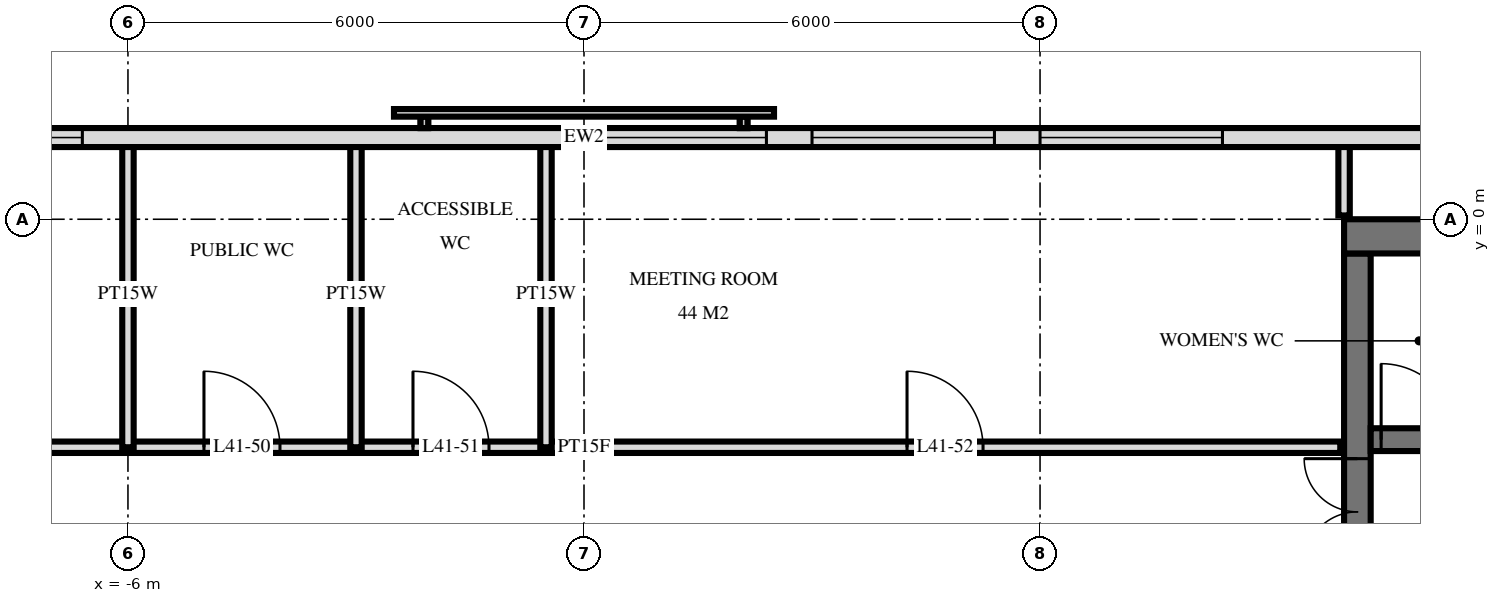
"""IFC4 building model, lengths in metres.
Left out: names, types, materials, properties, quantities, classifications, styles, units other than length and angle.
Written with IfcOpenShell. Run it as: python <this file> out.ifc"""

import sys

from ifc_helpers import new_model, si_unit, direction, frame, frame_2d, origin, place, context, subcontext, project, spatial, rectangle, extrude, element, fill, save


model = new_model("IFC4")
c1 = context("Model", 3, precision=1e-05, world=origin(), true_north=direction((0.0, 1.0)))
c2 = subcontext(c1, "Body", "Model", "MODEL_VIEW")
j1 = project(units=[si_unit("LENGTHUNIT", "METRE"), si_unit("PLANEANGLEUNIT", "RADIAN")], contexts=[c1])
p1 = place(None, origin())
s1 = spatial("IfcSite", under=j1, at=p1, CompositionType="ELEMENT")
p2 = place(p1, origin())
s2 = spatial("IfcBuilding", under=s1, at=p2, CompositionType="ELEMENT")
p3 = place(p2, frame((0.0, 0.0, 159.6)))
s3 = spatial("IfcBuildingStorey", under=s2, at=p3, CompositionType="ELEMENT", Elevation=159.6)
p4 = place(p3, frame((10.0, -0.225, 0.0), z_axis=(0.0, 0.0, 1.0), x_axis=(1.0, 0.0, 0.0)))
e1 = element("IfcWall", 1, at=p4, inside=s3, PredefinedType="SHEAR", context=c2, shape_type="SweptSolid", body=[
    extrude(rectangle(XDim=14.5, YDim=0.45, at=frame_2d((7.25, 0.0))), origin(), (0.0, 0.0, 1.0), 3.6),
])
p5 = place(p3, frame((10.175, -14.55, 0.0), z_axis=(0.0, 0.0, 1.0), x_axis=(0.0, 1.0, 0.0)))
e2 = element("IfcWall", 2, at=p5, inside=s3, PredefinedType="SHEAR", context=c2, shape_type="SweptSolid", body=[
    extrude(rectangle(XDim=14.1, YDim=0.35, at=frame_2d((7.05, 0.0))), origin(), (0.0, 0.0, 1.0), 3.6),
])
p6 = place(p5, frame((8.4, 0.0, 0.0)))
e3 = element("IfcOpeningElement", 3, at=p6, cuts=e2, PredefinedType="OPENING", context=c2, shape_type="SweptSolid", body=[
    extrude(rectangle(XDim=1.4, YDim=2.4, at=frame_2d((0.7, 1.2))), frame((0.0, 0.185, 0.0), z_axis=(0.0, -1.0, 0.0), x_axis=(1.0, 0.0, 0.0)), (0.0, 0.0, 1.0), 0.37),
])
p7 = place(p5, frame((10.0, 0.0, 0.0)))
e4 = element("IfcOpeningElement", 4, at=p7, cuts=e2, PredefinedType="OPENING", context=c2, shape_type="SweptSolid", body=[
    extrude(rectangle(XDim=1.4, YDim=2.4, at=frame_2d((0.7, 1.2))), frame((0.0, 0.185, 0.0), z_axis=(0.0, -1.0, 0.0), x_axis=(1.0, 0.0, 0.0)), (0.0, 0.0, 1.0), 0.37),
])
p8 = place(p5, frame((4.0, 0.0, 0.0)))
e5 = element("IfcOpeningElement", 5, at=p8, cuts=e2, PredefinedType="OPENING", context=c2, shape_type="SweptSolid", body=[
    extrude(rectangle(XDim=1.2, YDim=2.1, at=frame_2d((0.6, 1.05))), frame((0.0, 0.185, 0.0), z_axis=(0.0, -1.0, 0.0), x_axis=(1.0, 0.0, 0.0)), (0.0, 0.0, 1.0), 0.37),
])
p9 = place(p3, frame((10.35, -2.9, 0.0), z_axis=(0.0, 0.0, 1.0), x_axis=(1.0, 0.0, 0.0)))
e6 = element("IfcWall", 6, at=p9, inside=s3, PredefinedType="SHEAR", context=c2, shape_type="SweptSolid", body=[
    extrude(rectangle(XDim=13.7, YDim=0.3, at=frame_2d((6.85, 0.0))), origin(), (0.0, 0.0, 1.0), 3.6),
])
p10 = place(p9, frame((12.05, 0.0, 0.0)))
e7 = element("IfcOpeningElement", 7, at=p10, cuts=e6, PredefinedType="OPENING", context=c2, shape_type="SweptSolid", body=[
    extrude(rectangle(XDim=1.1, YDim=2.1, at=frame_2d((0.55, 1.05))), frame((0.0, 0.16, 0.0), z_axis=(0.0, -1.0, 0.0), x_axis=(1.0, 0.0, 0.0)), (0.0, 0.0, 1.0), 0.32),
])
p11 = place(p9, frame((6.188, 0.0, 0.0)))
e8 = element("IfcOpeningElement", 8, at=p11, cuts=e6, PredefinedType="OPENING", context=c2, shape_type="SweptSolid", body=[
    extrude(rectangle(XDim=0.9, YDim=2.1, at=frame_2d((0.45, 1.05))), frame((0.0, 0.16, 0.0), z_axis=(0.0, -1.0, 0.0), x_axis=(1.0, 0.0, 0.0)), (0.0, 0.0, 1.0), 0.32),
])
p12 = place(p9, frame((7.613, 0.0, 0.0)))
e9 = element("IfcOpeningElement", 9, at=p12, cuts=e6, PredefinedType="OPENING", context=c2, shape_type="SweptSolid", body=[
    extrude(rectangle(XDim=0.9, YDim=2.1, at=frame_2d((0.45, 1.05))), frame((0.0, 0.16, 0.0), z_axis=(0.0, -1.0, 0.0), x_axis=(1.0, 0.0, 0.0)), (0.0, 0.0, 1.0), 0.32),
])
p13 = place(p9, frame((0.137, 0.0, 0.0)))
e10 = element("IfcOpeningElement", 10, at=p13, cuts=e6, PredefinedType="OPENING", context=c2, shape_type="SweptSolid", body=[
    extrude(rectangle(XDim=1.0, YDim=2.1, at=frame_2d((0.5, 1.05))), frame((0.0, 0.16, 0.0), z_axis=(0.0, -1.0, 0.0), x_axis=(1.0, 0.0, 0.0)), (0.0, 0.0, 1.0), 0.32),
])
p14 = place(p9, frame((1.562, 0.0, 0.0)))
e11 = element("IfcOpeningElement", 11, at=p14, cuts=e6, PredefinedType="OPENING", context=c2, shape_type="SweptSolid", body=[
    extrude(rectangle(XDim=1.0, YDim=2.1, at=frame_2d((0.5, 1.05))), frame((0.0, 0.16, 0.0), z_axis=(0.0, -1.0, 0.0), x_axis=(1.0, 0.0, 0.0)), (0.0, 0.0, 1.0), 0.32),
])
p15 = place(p9, frame((3.85, 0.0, 0.0)))
e12 = element("IfcOpeningElement", 12, at=p15, cuts=e6, PredefinedType="OPENING", context=c2, shape_type="SweptSolid", body=[
    extrude(rectangle(XDim=1.0, YDim=2.1, at=frame_2d((0.5, 1.05))), frame((0.0, 0.16, 0.0), z_axis=(0.0, -1.0, 0.0), x_axis=(1.0, 0.0, 0.0)), (0.0, 0.0, 1.0), 0.32),
])
p16 = place(p9, frame((9.7, 0.0, 0.0)))
e13 = element("IfcOpeningElement", 13, at=p16, cuts=e6, PredefinedType="OPENING", context=c2, shape_type="SweptSolid", body=[
    extrude(rectangle(XDim=1.0, YDim=2.1, at=frame_2d((0.5, 1.05))), frame((0.0, 0.16, 0.0), z_axis=(0.0, -1.0, 0.0), x_axis=(1.0, 0.0, 0.0)), (0.0, 0.0, 1.0), 0.32),
])
p17 = place(p3, frame((23.675, 1.075, 0.0), z_axis=(0.0, 0.0, 1.0), x_axis=(-1.0, 0.0, 0.0)))
e14 = element("IfcWall", 14, at=p17, inside=s3, PredefinedType="SOLIDWALL", context=c2, shape_type="SweptSolid", body=[
    extrude(rectangle(XDim=47.351, YDim=0.25, at=frame_2d((23.675, 0.0))), origin(), (0.0, 0.0, 1.0), 3.32),
])
p18 = place(p17, frame((15.275, 0.0, 0.3)))
e15 = element("IfcOpeningElement", 15, at=p18, cuts=e14, PredefinedType="OPENING", context=c2, shape_type="SweptSolid", body=[
    extrude(rectangle(XDim=2.4, YDim=2.1, at=frame_2d((1.2, 1.05))), frame((0.0, 0.135, 0.0), z_axis=(0.0, -1.0, 0.0), x_axis=(1.0, 0.0, 0.0)), (0.0, 0.0, 1.0), 0.27),
])
p19 = place(p17, frame((18.275, 0.0, 0.3)))
e16 = element("IfcOpeningElement", 16, at=p19, cuts=e14, PredefinedType="OPENING", context=c2, shape_type="SweptSolid", body=[
    extrude(rectangle(XDim=2.4, YDim=2.1, at=frame_2d((1.2, 1.05))), frame((0.0, 0.135, 0.0), z_axis=(0.0, -1.0, 0.0), x_axis=(1.0, 0.0, 0.0)), (0.0, 0.0, 1.0), 0.27),
])
p20 = place(p17, frame((21.275, 0.0, 0.3)))
e17 = element("IfcOpeningElement", 17, at=p20, cuts=e14, PredefinedType="OPENING", context=c2, shape_type="SweptSolid", body=[
    extrude(rectangle(XDim=2.4, YDim=2.1, at=frame_2d((1.2, 1.05))), frame((0.0, 0.135, 0.0), z_axis=(0.0, -1.0, 0.0), x_axis=(1.0, 0.0, 0.0)), (0.0, 0.0, 1.0), 0.27),
])
p21 = place(p17, frame((30.275, 0.0, 0.3)))
e18 = element("IfcOpeningElement", 18, at=p21, cuts=e14, PredefinedType="OPENING", context=c2, shape_type="SweptSolid", body=[
    extrude(rectangle(XDim=2.4, YDim=2.1, at=frame_2d((1.2, 1.05))), frame((0.0, 0.135, 0.0), z_axis=(0.0, -1.0, 0.0), x_axis=(1.0, 0.0, 0.0)), (0.0, 0.0, 1.0), 0.27),
])
p22 = place(p3, frame((10.0, 0.05, 0.0), z_axis=(0.0, 0.0, 1.0), x_axis=(0.0, 1.0, 0.0)))
e19 = element("IfcWall", 19, at=p22, inside=s3, PredefinedType="PARTITIONING", context=c2, shape_type="SweptSolid", body=[
    extrude(rectangle(XDim=0.97, YDim=0.15, at=frame_2d((0.485, 0.0))), origin(), (0.0, 0.0, 1.0), 3.32),
])
for number, where, z_axis, x_axis in (
    (20, (-0.5, -3.0, 0.0), (0.0, 0.0, 1.0), (0.0, 1.0, 0.0)),
    (21, (-3.0, -3.0, 0.0), (0.0, 0.0, 1.0), (0.0, 1.0, 0.0)),
    (22, (-6.0, -3.0, 0.0), (0.0, 0.0, 1.0), (0.0, 1.0, 0.0)),
):
    element("IfcWall", number, at=place(p3, frame(where, z_axis=z_axis, x_axis=x_axis)), inside=s3, PredefinedType="PLUMBINGWALL", context=c2, shape_type="SweptSolid", body=[
        extrude(rectangle(XDim=4.02, YDim=0.15, at=frame_2d((2.01, 0.0))), origin(), (0.0, 0.0, 1.0), 3.32),
    ])
p23 = place(p3, frame((-9.95, -3.0, 0.0), z_axis=(0.0, 0.0, 1.0), x_axis=(1.0, 0.0, 0.0)))
e23 = element("IfcWall", 23, at=p23, inside=s3, PredefinedType="PARTITIONING", context=c2, shape_type="SweptSolid", body=[
    extrude(rectangle(XDim=19.9, YDim=0.15, at=frame_2d((9.95, 0.0))), origin(), (0.0, 0.0, 1.0), 3.32),
])
p24 = place(p23, frame((1.45, 0.0, 0.0)))
e24 = element("IfcOpeningElement", 24, at=p24, cuts=e23, PredefinedType="OPENING", context=c2, shape_type="SweptSolid", body=[
    extrude(rectangle(XDim=1.0, YDim=2.1, at=frame_2d((0.5, 1.05))), frame((0.0, 0.085, 0.0), z_axis=(0.0, -1.0, 0.0), x_axis=(1.0, 0.0, 0.0)), (0.0, 0.0, 1.0), 0.17),
])
p25 = place(p23, frame((4.95, 0.0, 0.0)))
e25 = element("IfcOpeningElement", 25, at=p25, cuts=e23, PredefinedType="OPENING", context=c2, shape_type="SweptSolid", body=[
    extrude(rectangle(XDim=1.0, YDim=2.1, at=frame_2d((0.5, 1.05))), frame((0.0, 0.085, 0.0), z_axis=(0.0, -1.0, 0.0), x_axis=(1.0, 0.0, 0.0)), (0.0, 0.0, 1.0), 0.17),
])
p26 = place(p23, frame((7.7, 0.0, 0.0)))
e26 = element("IfcOpeningElement", 26, at=p26, cuts=e23, PredefinedType="OPENING", context=c2, shape_type="SweptSolid", body=[
    extrude(rectangle(XDim=1.0, YDim=2.1, at=frame_2d((0.5, 1.05))), frame((0.0, 0.085, 0.0), z_axis=(0.0, -1.0, 0.0), x_axis=(1.0, 0.0, 0.0)), (0.0, 0.0, 1.0), 0.17),
])
p27 = place(p23, frame((14.2, 0.0, 0.0)))
e27 = element("IfcOpeningElement", 27, at=p27, cuts=e23, PredefinedType="OPENING", context=c2, shape_type="SweptSolid", body=[
    extrude(rectangle(XDim=1.0, YDim=2.1, at=frame_2d((0.5, 1.05))), frame((0.0, 0.085, 0.0), z_axis=(0.0, -1.0, 0.0), x_axis=(1.0, 0.0, 0.0)), (0.0, 0.0, 1.0), 0.17),
])
p28 = place(p18, origin())
e28 = element("IfcWindow", 28, at=p28, inside=s3, PartitioningType="SINGLE_PANEL", PredefinedType="WINDOW", context=c2, shape_type="SweptSolid", body=[
    extrude(rectangle(XDim=2.4, YDim=2.1, at=frame_2d((1.2, 1.05))), frame((0.0, 0.03, 0.0), z_axis=(0.0, -1.0, 0.0), x_axis=(1.0, 0.0, 0.0)), (0.0, 0.0, 1.0), 0.06),
])
fill(e15, e28)
p29 = place(p19, origin())
e29 = element("IfcWindow", 29, at=p29, inside=s3, PartitioningType="SINGLE_PANEL", PredefinedType="WINDOW", context=c2, shape_type="SweptSolid", body=[
    extrude(rectangle(XDim=2.4, YDim=2.1, at=frame_2d((1.2, 1.05))), frame((0.0, 0.03, 0.0), z_axis=(0.0, -1.0, 0.0), x_axis=(1.0, 0.0, 0.0)), (0.0, 0.0, 1.0), 0.06),
])
fill(e16, e29)
p30 = place(p20, origin())
e30 = element("IfcWindow", 30, at=p30, inside=s3, PartitioningType="SINGLE_PANEL", PredefinedType="WINDOW", context=c2, shape_type="SweptSolid", body=[
    extrude(rectangle(XDim=2.4, YDim=2.1, at=frame_2d((1.2, 1.05))), frame((0.0, 0.03, 0.0), z_axis=(0.0, -1.0, 0.0), x_axis=(1.0, 0.0, 0.0)), (0.0, 0.0, 1.0), 0.06),
])
fill(e17, e30)
p31 = place(p21, origin())
e31 = element("IfcWindow", 31, at=p31, inside=s3, PartitioningType="SINGLE_PANEL", PredefinedType="WINDOW", context=c2, shape_type="SweptSolid", body=[
    extrude(rectangle(XDim=2.4, YDim=2.1, at=frame_2d((1.2, 1.05))), frame((0.0, 0.03, 0.0), z_axis=(0.0, -1.0, 0.0), x_axis=(1.0, 0.0, 0.0)), (0.0, 0.0, 1.0), 0.06),
])
fill(e18, e31)
p32 = place(p7, origin())
e32 = element("IfcDoor", 32, at=p32, inside=s3, OperationType="DOUBLE_DOOR_SINGLE_SWING", PredefinedType="DOOR", context=c2, shape_type="SweptSolid", body=[
    extrude(rectangle(XDim=1.4, YDim=2.4, at=frame_2d((0.7, 1.2))), frame((0.0, 0.025, 0.0), z_axis=(0.0, -1.0, 0.0), x_axis=(1.0, 0.0, 0.0)), (0.0, 0.0, 1.0), 0.05),
])
fill(e4, e32)
p33 = place(p13, origin())
e33 = element("IfcDoor", 33, at=p33, inside=s3, OperationType="SINGLE_SWING_RIGHT", PredefinedType="DOOR", context=c2, shape_type="SweptSolid", body=[
    extrude(rectangle(XDim=1.0, YDim=2.1, at=frame_2d((0.5, 1.05))), frame((0.0, 0.025, 0.0), z_axis=(0.0, -1.0, 0.0), x_axis=(1.0, 0.0, 0.0)), (0.0, 0.0, 1.0), 0.05),
])
fill(e10, e33)
p34 = place(p25, origin())
e34 = element("IfcDoor", 34, at=p34, inside=s3, OperationType="SINGLE_SWING_RIGHT", PredefinedType="DOOR", context=c2, shape_type="SweptSolid", body=[
    extrude(rectangle(XDim=1.0, YDim=2.1, at=frame_2d((0.5, 1.05))), frame((0.0, 0.025, 0.0), z_axis=(0.0, -1.0, 0.0), x_axis=(1.0, 0.0, 0.0)), (0.0, 0.0, 1.0), 0.05),
])
fill(e25, e34)
p35 = place(p26, origin())
e35 = element("IfcDoor", 35, at=p35, inside=s3, OperationType="SINGLE_SWING_RIGHT", PredefinedType="DOOR", context=c2, shape_type="SweptSolid", body=[
    extrude(rectangle(XDim=1.0, YDim=2.1, at=frame_2d((0.5, 1.05))), frame((0.0, 0.025, 0.0), z_axis=(0.0, -1.0, 0.0), x_axis=(1.0, 0.0, 0.0)), (0.0, 0.0, 1.0), 0.05),
])
fill(e26, e35)
p36 = place(p27, origin())
e36 = element("IfcDoor", 36, at=p36, inside=s3, OperationType="SINGLE_SWING_RIGHT", PredefinedType="DOOR", context=c2, shape_type="SweptSolid", body=[
    extrude(rectangle(XDim=1.0, YDim=2.1, at=frame_2d((0.5, 1.05))), frame((0.0, 0.025, 0.0), z_axis=(0.0, -1.0, 0.0), x_axis=(1.0, 0.0, 0.0)), (0.0, 0.0, 1.0), 0.05),
])
fill(e27, e36)
save(model, sys.argv[1])
